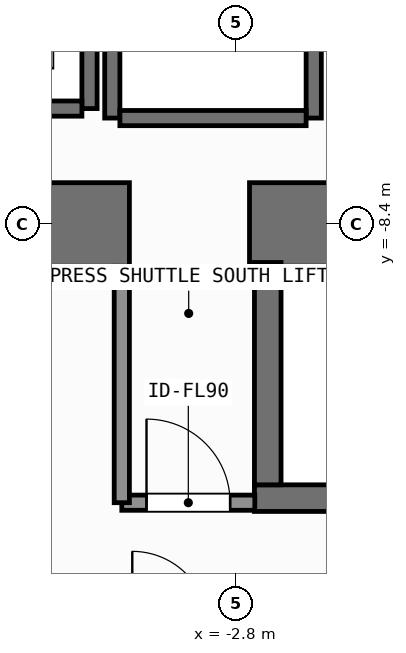
"""IFC4 building model, lengths in metres.
Left out: names, types, materials, properties, quantities, classifications, styles, units other than length and angle.
Written with IfcOpenShell. Run it as: python <this file> out.ifc"""

import sys

from ifc_helpers import new_model, si_unit, direction, frame, frame_2d, origin, place, context, subcontext, project, spatial, rectangle, extrude, element, fill, save


model = new_model("IFC4")
c1 = context("Model", 3, precision=1e-05, world=origin(), true_north=direction((0.0, 1.0)))
c2 = subcontext(c1, "Body", "Model", "MODEL_VIEW")
j1 = project(units=[si_unit("LENGTHUNIT", "METRE"), si_unit("PLANEANGLEUNIT", "RADIAN")], contexts=[c1])
p1 = place(None, origin())
s1 = spatial("IfcSite", under=j1, at=p1, CompositionType="ELEMENT")
p2 = place(p1, origin())
s2 = spatial("IfcBuilding", under=s1, at=p2, CompositionType="ELEMENT")
p3 = place(p2, frame((0.0, 0.0, 38.4)))
s3 = spatial("IfcBuildingStorey", under=s2, at=p3, CompositionType="ELEMENT", Elevation=38.4)
p4 = place(p3, frame((-7.55, -8.4, 0.0), z_axis=(0.0, 0.0, 1.0), x_axis=(1.0, 0.0, 0.0)))
e1 = element("IfcWall", 1, at=p4, inside=s3, PredefinedType="SHEAR", context=c2, shape_type="SweptSolid", body=[
    extrude(rectangle(XDim=3.35, YDim=1.1, at=frame_2d((1.675, 0.0))), origin(), (0.0, 0.0, 1.0), 3.9),
])
p5 = place(p3, frame((-2.62, -8.4, 0.0), z_axis=(0.0, 0.0, 1.0), x_axis=(1.0, 0.0, 0.0)))
e2 = element("IfcWall", 2, at=p5, inside=s3, PredefinedType="SHEAR", context=c2, shape_type="SweptSolid", body=[
    extrude(rectangle(XDim=7.27, YDim=1.1, at=frame_2d((3.635, 0.0))), origin(), (0.0, 0.0, 1.0), 3.9),
])
p6 = place(p3, frame((-2.555, -12.0, 0.0), z_axis=(0.0, 0.0, 1.0), x_axis=(1.0, 0.0, 0.0)))
e3 = element("IfcWall", 3, at=p6, inside=s3, PredefinedType="SHEAR", context=c2, shape_type="SweptSolid", body=[
    extrude(rectangle(XDim=7.31, YDim=0.35, at=frame_2d((3.655, 0.0))), origin(), (0.0, 0.0, 1.0), 3.9),
])
p7 = place(p3, frame((-2.2, -8.988, 0.0), z_axis=(0.0, 0.0, 1.0), x_axis=(1.0, 0.0, 0.0)))
e4 = element("IfcWall", 4, at=p7, inside=s3, PredefinedType="SHEAR", context=c2, shape_type="SweptSolid", body=[
    extrude(rectangle(XDim=6.6, YDim=0.075, at=frame_2d((3.3, 0.0))), origin(), (0.0, 0.0, 1.0), 3.9),
])
p8 = place(p3, frame((-2.38, -11.825, 0.0), z_axis=(0.0, 0.0, 1.0), x_axis=(0.0, 1.0, 0.0)))
e5 = element("IfcWall", 5, at=p8, inside=s3, PredefinedType="SHEAR", context=c2, shape_type="SweptSolid", body=[
    extrude(rectangle(XDim=2.925, YDim=0.35, at=frame_2d((1.462, 0.0))), origin(), (0.0, 0.0, 1.0), 3.9),
])
p9 = place(p3, frame((-4.725, -6.875, 0.0), z_axis=(0.0, 0.0, 1.0), x_axis=(0.0, 1.0, 0.0)))
e6 = element("IfcWall", 6, at=p9, inside=s3, PredefinedType="SHEAR", context=c2, shape_type="SweptSolid", body=[
    extrude(rectangle(XDim=2.55, YDim=0.2, at=frame_2d((1.275, 0.0))), origin(), (0.0, 0.0, 1.0), 3.68),
])
p10 = place(p3, frame((-7.175, -6.875, 0.0), z_axis=(0.0, 0.0, 1.0), x_axis=(1.0, 0.0, 0.0)))
e7 = element("IfcWall", 7, at=p10, inside=s3, PredefinedType="SHEAR", context=c2, shape_type="SweptSolid", body=[
    extrude(rectangle(XDim=2.35, YDim=0.2, at=frame_2d((1.175, 0.0))), origin(), (0.0, 0.0, 1.0), 3.68),
])
for number, where, z_axis, x_axis in (
    (8, (-4.425, -7.0, 0.0), (0.0, 0.0, 1.0), (0.0, 1.0, 0.0)),
    (9, (-1.775, -7.0, 0.0), (0.0, 0.0, 1.0), (0.0, 1.0, 0.0)),
):
    element("IfcWall", number, at=place(p3, frame(where, z_axis=z_axis, x_axis=x_axis)), inside=s3, PredefinedType="SHEAR", context=c2, shape_type="SweptSolid", body=[
        extrude(rectangle(XDim=2.8, YDim=0.2, at=frame_2d((1.4, 0.0))), origin(), (0.0, 0.0, 1.0), 3.68),
    ])
p11 = place(p3, frame((-4.325, -7.0, 0.0), z_axis=(0.0, 0.0, 1.0), x_axis=(1.0, 0.0, 0.0)))
e10 = element("IfcWall", 10, at=p11, inside=s3, PredefinedType="SHEAR", context=c2, shape_type="SweptSolid", body=[
    extrude(rectangle(XDim=2.45, YDim=0.2, at=frame_2d((1.225, 0.0))), origin(), (0.0, 0.0, 1.0), 3.68),
])
p12 = place(p3, frame((-4.3, -12.06, 0.0), z_axis=(0.0, 0.0, 1.0), x_axis=(1.0, 0.0, 0.0)))
e11 = element("IfcWall", 11, at=p12, inside=s3, PredefinedType="SOLIDWALL", context=c2, shape_type="SweptSolid", body=[
    extrude(rectangle(XDim=1.75, YDim=0.2, at=frame_2d((0.875, 0.0))), origin(), (0.0, 0.0, 1.0), 3.68),
])
p13 = place(p12, frame((0.325, 0.0, 0.0)))
e12 = element("IfcOpeningElement", 12, at=p13, cuts=e11, PredefinedType="OPENING", context=c2, shape_type="SweptSolid", body=[
    extrude(rectangle(XDim=1.1, YDim=2.15, at=frame_2d((0.55, 1.075))), frame((0.0, 0.11, 0.0), z_axis=(0.0, -1.0, 0.0), x_axis=(1.0, 0.0, 0.0)), (0.0, 0.0, 1.0), 0.22),
])
p14 = place(p3, frame((-4.3, -12.06, 0.0), z_axis=(0.0, 0.0, 1.0), x_axis=(0.0, 1.0, 0.0)))
e13 = element("IfcWall", 13, at=p14, inside=s3, PredefinedType="SOLIDWALL", context=c2, shape_type="SweptSolid", body=[
    extrude(rectangle(XDim=3.11, YDim=0.2, at=frame_2d((1.555, 0.0))), origin(), (0.0, 0.0, 1.0), 3.68),
])
p15 = place(p13, origin())
e14 = element("IfcDoor", 14, at=p15, inside=s3, OperationType="SINGLE_SWING_LEFT", PredefinedType="DOOR", context=c2, shape_type="SweptSolid", body=[
    extrude(rectangle(XDim=1.1, YDim=2.15, at=frame_2d((0.55, 1.075))), frame((0.0, 0.025, 0.0), z_axis=(0.0, -1.0, 0.0), x_axis=(1.0, 0.0, 0.0)), (0.0, 0.0, 1.0), 0.05),
])
fill(e12, e14)
save(model, sys.argv[1])
